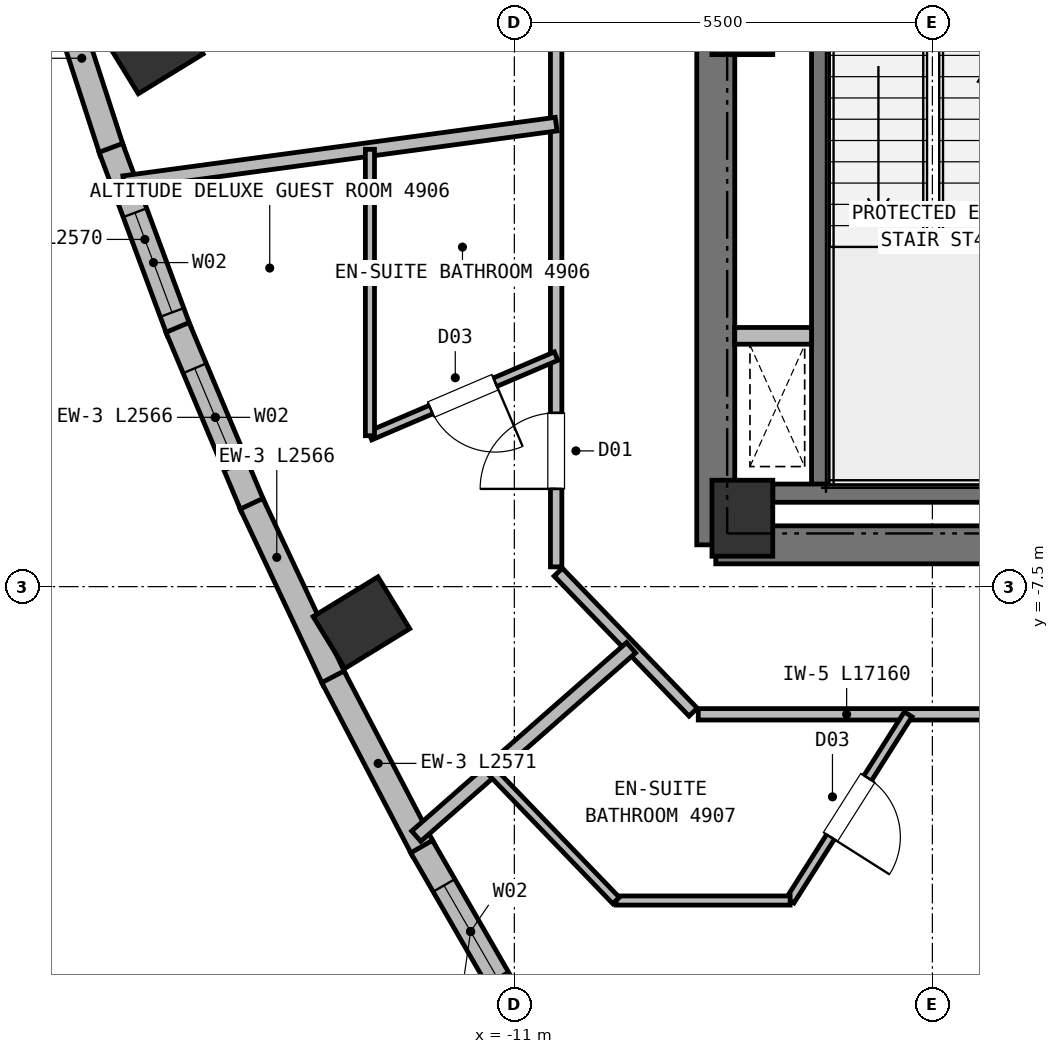
"""IFC4 building model, lengths in metres.
Left out: names, types, materials, properties, quantities, classifications, styles, units other than length and angle.
Written with IfcOpenShell. Run it as: python <this file> out.ifc"""

import sys

from ifc_helpers import new_model, si_unit, direction, frame, frame_2d, origin, origin_2d, place, context, subcontext, project, spatial, rectangle, extrude, element, fill, save


model = new_model("IFC4")
c1 = context("Model", 3, precision=1e-05, world=origin(), true_north=direction((0.0, 1.0)))
c2 = subcontext(c1, "Body", "Model", "MODEL_VIEW")
j1 = project(units=[si_unit("LENGTHUNIT", "METRE"), si_unit("PLANEANGLEUNIT", "RADIAN")], contexts=[c1])
p1 = place(None, origin())
s1 = spatial("IfcSite", under=j1, at=p1, CompositionType="ELEMENT")
p2 = place(p1, origin())
s2 = spatial("IfcBuilding", under=s1, at=p2, CompositionType="ELEMENT")
p3 = place(p2, frame((0.0, 0.0, 186.55)))
s3 = spatial("IfcBuildingStorey", under=s2, at=p3, CompositionType="ELEMENT", Elevation=186.55)
for number, where, z_axis, x_axis in (
    (1, (-8.0, -6.6, 0.0), (0.0, 0.0, 1.0), (1.0, 0.0, 0.0)),
    (2, (-8.0, 0.0, 0.0), (0.0, 0.0, 1.0), (1.0, 0.0, 0.0)),
):
    element("IfcColumn", number, at=place(p3, frame(where, z_axis=z_axis, x_axis=x_axis)), inside=s3, PredefinedType="COLUMN", context=c2, shape_type="SweptSolid", body=[
        extrude(rectangle(XDim=0.8, YDim=1.0, at=origin_2d()), origin(), (0.0, 0.0, 1.0), 3.8),
    ])
p4 = place(p3, frame((-8.35, -6.95, 0.0), z_axis=(0.0, 0.0, 1.0), x_axis=(1.0, 0.0, 0.0)))
e3 = element("IfcWall", 3, at=p4, inside=s3, PredefinedType="SHEAR", context=c2, shape_type="SweptSolid", body=[
    extrude(rectangle(XDim=3.95, YDim=0.5, at=frame_2d((1.975, 0.0))), origin(), (0.0, 0.0, 1.0), 3.55),
])
p5 = place(p3, frame((-8.35, -6.95, 0.0), z_axis=(0.0, 0.0, 1.0), x_axis=(0.0, 1.0, 0.0)))
e4 = element("IfcWall", 4, at=p5, inside=s3, PredefinedType="SHEAR", context=c2, shape_type="SweptSolid", body=[
    extrude(rectangle(XDim=8.1, YDim=0.5, at=frame_2d((4.05, 0.0))), origin(), (0.0, 0.0, 1.0), 3.55),
])
for number, where, z_axis, x_axis in (
    (5, (-15.73, -0.412, 0.0), (0.0, 0.0, 1.0), (-0.522, 0.853, 0.0)),
    (6, (-13.012, -7.974, 0.0), (0.0, 0.0, 1.0), (-0.522, 0.853, 0.0)),
):
    element("IfcColumn", number, at=place(p3, frame(where, z_axis=z_axis, x_axis=x_axis)), inside=s3, PredefinedType="COLUMN", context=c2, shape_type="SweptSolid", body=[
        extrude(rectangle(XDim=0.8, YDim=1.0, at=origin_2d()), origin(), (0.0, 0.0, 1.0), 3.8),
    ])
p6 = place(p3, frame((-16.293, -1.774, 0.0), z_axis=(0.0, 0.0, 1.0), x_axis=(-0.309148141518, 0.951013894008, 0.0)))
e7 = element("IfcWall", 7, at=p6, inside=s3, PredefinedType="SOLIDWALL", context=c2, shape_type="SweptSolid", body=[
    extrude(rectangle(XDim=2.579, YDim=0.33, at=frame_2d((1.29, 0.0))), origin(), (0.0, 0.0, 1.0), 3.55),
])
p7 = place(p3, frame((-15.413, -4.136, 0.0), z_axis=(0.0, 0.0, 1.0), x_axis=(-0.348582368666, 0.937278150954, 0.0)))
e8 = element("IfcWall", 8, at=p7, inside=s3, PredefinedType="SOLIDWALL", context=c2, shape_type="SweptSolid", body=[
    extrude(rectangle(XDim=2.57, YDim=0.33, at=frame_2d((1.285, 0.0))), origin(), (0.0, 0.0, 1.0), 3.55),
])
p8 = place(p7, frame((0.26, 0.0, 0.72)))
e9 = element("IfcOpeningElement", 9, at=p8, cuts=e8, PredefinedType="OPENING", context=c2, shape_type="SweptSolid", body=[
    extrude(rectangle(XDim=1.4, YDim=1.84, at=frame_2d((0.7, 0.92))), frame((0.0, 0.175, 0.0), z_axis=(0.0, -1.0, 0.0), x_axis=(1.0, 0.0, 0.0)), (0.0, 0.0, 1.0), 0.35),
])
p9 = place(p3, frame((-14.437, -6.455, 0.0), z_axis=(0.0, 0.0, 1.0), x_axis=(-0.387525243304, 0.921859092162, 0.0)))
e10 = element("IfcWall", 10, at=p9, inside=s3, PredefinedType="SOLIDWALL", context=c2, shape_type="SweptSolid", body=[
    extrude(rectangle(XDim=2.566, YDim=0.33, at=frame_2d((1.283, 0.0))), origin(), (0.0, 0.0, 1.0), 3.55),
])
p10 = place(p9, frame((0.583, 0.0, 0.72)))
e11 = element("IfcOpeningElement", 11, at=p10, cuts=e10, PredefinedType="OPENING", context=c2, shape_type="SweptSolid", body=[
    extrude(rectangle(XDim=1.4, YDim=1.84, at=frame_2d((0.7, 0.92))), frame((0.0, 0.175, 0.0), z_axis=(0.0, -1.0, 0.0), x_axis=(1.0, 0.0, 0.0)), (0.0, 0.0, 1.0), 0.35),
])
p11 = place(p3, frame((-13.365, -8.731, 0.0), z_axis=(0.0, 0.0, 1.0), x_axis=(-0.425774125911, 0.90482948322, 0.0)))
e12 = element("IfcWall", 12, at=p11, inside=s3, PredefinedType="SOLIDWALL", context=c2, shape_type="SweptSolid", body=[
    extrude(rectangle(XDim=2.566, YDim=0.33, at=frame_2d((1.283, 0.0))), origin(), (0.0, 0.0, 1.0), 3.55),
])
p12 = place(p3, frame((-12.196, -10.965, 0.0), z_axis=(0.0, 0.0, 1.0), x_axis=(-0.463361004434, 0.886169611062, 0.0)))
e13 = element("IfcWall", 13, at=p12, inside=s3, PredefinedType="SOLIDWALL", context=c2, shape_type="SweptSolid", body=[
    extrude(rectangle(XDim=2.571, YDim=0.33, at=frame_2d((1.285, 0.0))), origin(), (0.0, 0.0, 1.0), 3.55),
])
p13 = place(p3, frame((-10.931, -13.155, 0.0), z_axis=(0.0, 0.0, 1.0), x_axis=(-0.499875407217, 0.866097325513, 0.0)))
e14 = element("IfcWall", 14, at=p13, inside=s3, PredefinedType="SOLIDWALL", context=c2, shape_type="SweptSolid", body=[
    extrude(rectangle(XDim=2.579, YDim=0.33, at=frame_2d((1.29, 0.0))), origin(), (0.0, 0.0, 1.0), 3.55),
])
p14 = place(p13, frame((0.59, 0.0, 0.72)))
e15 = element("IfcOpeningElement", 15, at=p14, cuts=e14, PredefinedType="OPENING", context=c2, shape_type="SweptSolid", body=[
    extrude(rectangle(XDim=1.4, YDim=1.84, at=frame_2d((0.7, 0.92))), frame((0.0, 0.175, 0.0), z_axis=(0.0, -1.0, 0.0), x_axis=(1.0, 0.0, 0.0)), (0.0, 0.0, 1.0), 0.35),
])
p15 = place(p3, frame((-6.97, -6.16, 0.0), z_axis=(0.0, 0.0, 1.0), x_axis=(0.0, 1.0, 0.0)))
e16 = element("IfcWall", 16, at=p15, inside=s3, PredefinedType="SHEAR", context=c2, shape_type="SweptSolid", body=[
    extrude(rectangle(XDim=7.22, YDim=0.24, at=frame_2d((3.61, 0.0))), origin(), (0.0, 0.0, 1.0), 3.55),
])
p16 = place(p3, frame((-7.6, -6.27, 0.0), z_axis=(0.0, 0.0, 1.0), x_axis=(1.0, 0.0, 0.0)))
e17 = element("IfcWall", 17, at=p16, inside=s3, PredefinedType="SHEAR", context=c2, shape_type="SweptSolid", body=[
    extrude(rectangle(XDim=3.59, YDim=0.24, at=frame_2d((1.795, 0.0))), origin(), (0.0, 0.0, 1.0), 3.55),
])
p17 = place(p3, frame((-8.1, -4.2, 0.0), z_axis=(0.0, 0.0, 1.0), x_axis=(1.0, 0.0, 0.0)))
e18 = element("IfcWall", 18, at=p17, inside=s3, PredefinedType="PARTITIONING", context=c2, shape_type="SweptSolid", body=[
    extrude(rectangle(XDim=1.01, YDim=0.22, at=frame_2d((0.505, 0.0))), origin(), (0.0, 0.0, 1.0), 3.55),
])
p18 = place(p3, frame((8.58, -9.18, 0.0), z_axis=(0.0, 0.0, 1.0), x_axis=(-1.0, 0.0, 0.0)))
e19 = element("IfcWall", 19, at=p18, inside=s3, PredefinedType="PARTITIONING", context=c2, shape_type="SweptSolid", body=[
    extrude(rectangle(XDim=17.16, YDim=0.15, at=frame_2d((8.58, 0.0))), origin(), (0.0, 0.0, 1.0), 3.23),
])
p19 = place(p18, frame((2.444, 0.0, 0.0)))
e20 = element("IfcOpeningElement", 20, at=p19, cuts=e19, PredefinedType="OPENING", context=c2, shape_type="SweptSolid", body=[
    extrude(rectangle(XDim=0.95, YDim=2.1, at=frame_2d((0.475, 1.05))), frame((0.0, 0.085, 0.0), z_axis=(0.0, -1.0, 0.0), x_axis=(1.0, 0.0, 0.0)), (0.0, 0.0, 1.0), 0.17),
])
p20 = place(p18, frame((4.798, 0.0, 0.0)))
e21 = element("IfcOpeningElement", 21, at=p20, cuts=e19, PredefinedType="OPENING", context=c2, shape_type="SweptSolid", body=[
    extrude(rectangle(XDim=1.0, YDim=2.15, at=frame_2d((0.5, 1.075))), frame((0.0, 0.085, 0.0), z_axis=(0.0, -1.0, 0.0), x_axis=(1.0, 0.0, 0.0)), (0.0, 0.0, 1.0), 0.17),
])
p21 = place(p18, frame((12.096, 0.0, 0.0)))
e22 = element("IfcOpeningElement", 22, at=p21, cuts=e19, PredefinedType="OPENING", context=c2, shape_type="SweptSolid", body=[
    extrude(rectangle(XDim=1.06, YDim=2.15, at=frame_2d((0.53, 1.075))), frame((0.0, 0.085, 0.0), z_axis=(0.0, -1.0, 0.0), x_axis=(1.0, 0.0, 0.0)), (0.0, 0.0, 1.0), 0.17),
])
p22 = place(p18, frame((8.137, 0.0, 0.0)))
e23 = element("IfcOpeningElement", 23, at=p22, cuts=e19, PredefinedType="OPENING", context=c2, shape_type="SweptSolid", body=[
    extrude(rectangle(XDim=1.0, YDim=2.15, at=frame_2d((0.5, 1.075))), frame((0.0, 0.085, 0.0), z_axis=(0.0, -1.0, 0.0), x_axis=(1.0, 0.0, 0.0)), (0.0, 0.0, 1.0), 0.17),
])
p23 = place(p3, frame((-10.45, -7.24, 0.0), z_axis=(0.0, 0.0, 1.0), x_axis=(0.0, 1.0, 0.0)))
e24 = element("IfcWall", 24, at=p23, inside=s3, PredefinedType="PARTITIONING", context=c2, shape_type="SweptSolid", body=[
    extrude(rectangle(XDim=14.48, YDim=0.15, at=frame_2d((7.24, 0.0))), origin(), (0.0, 0.0, 1.0), 3.23),
])
p24 = place(p23, frame((1.026, 0.0, 0.0)))
e25 = element("IfcOpeningElement", 25, at=p24, cuts=e24, PredefinedType="OPENING", context=c2, shape_type="SweptSolid", body=[
    extrude(rectangle(XDim=1.0, YDim=2.15, at=frame_2d((0.5, 1.075))), frame((0.0, 0.085, 0.0), z_axis=(0.0, -1.0, 0.0), x_axis=(1.0, 0.0, 0.0)), (0.0, 0.0, 1.0), 0.17),
])
p25 = place(p23, frame((7.126, 0.0, 0.0)))
e26 = element("IfcOpeningElement", 26, at=p25, cuts=e24, PredefinedType="OPENING", context=c2, shape_type="SweptSolid", body=[
    extrude(rectangle(XDim=1.06, YDim=2.15, at=frame_2d((0.53, 1.075))), frame((0.0, 0.085, 0.0), z_axis=(0.0, -1.0, 0.0), x_axis=(1.0, 0.0, 0.0)), (0.0, 0.0, 1.0), 0.17),
])
p26 = place(p3, frame((-8.648, -9.151, 0.0), z_axis=(0.0, 0.0, 1.0), x_axis=(-0.693764562202, 0.720201869085, 0.0)))
e27 = element("IfcWall", 27, at=p26, inside=s3, PredefinedType="PARTITIONING", context=c2, shape_type="SweptSolid", body=[
    extrude(rectangle(XDim=2.558, YDim=0.15, at=frame_2d((1.279, 0.0))), origin(), (0.0, 0.0, 1.0), 3.23),
])
p27 = place(p3, frame((-10.45, -1.415, 0.0), z_axis=(0.0, 0.0, 1.0), x_axis=(-0.990963730959, -0.13413010074, 0.0)))
e28 = element("IfcWall", 28, at=p27, inside=s3, PredefinedType="PARTITIONING", context=c2, shape_type="SweptSolid", body=[
    extrude(rectangle(XDim=5.741, YDim=0.18, at=frame_2d((2.87, 0.0))), origin(), (0.0, 0.0, 1.0), 3.55),
])
p28 = place(p3, frame((-10.45, -4.467, 0.0), z_axis=(0.0, 0.0, 1.0), x_axis=(-0.919533231313, -0.39301226, 0.0)))
e29 = element("IfcWall", 29, at=p28, inside=s3, PredefinedType="PARTITIONING", context=c2, shape_type="SweptSolid", body=[
    extrude(rectangle(XDim=2.664, YDim=0.12, at=frame_2d((1.332, 0.0))), origin(), (0.0, 0.0, 1.0), 3.55),
])
p29 = place(p28, frame((0.872, 0.0, 0.0)))
e30 = element("IfcOpeningElement", 30, at=p29, cuts=e29, PredefinedType="OPENING", context=c2, shape_type="SweptSolid", body=[
    extrude(rectangle(XDim=0.92, YDim=2.1, at=frame_2d((0.46, 1.05))), frame((0.0, 0.07, 0.0), z_axis=(0.0, -1.0, 0.0), x_axis=(1.0, 0.0, 0.0)), (0.0, 0.0, 1.0), 0.14),
])
p30 = place(p3, frame((-12.9, -1.746, 0.0), z_axis=(0.0, 0.0, 1.0), x_axis=(0.0, -1.0, 0.0)))
e31 = element("IfcWall", 31, at=p30, inside=s3, PredefinedType="PARTITIONING", context=c2, shape_type="SweptSolid", body=[
    extrude(rectangle(XDim=3.768, YDim=0.12, at=frame_2d((1.884, 0.0))), origin(), (0.0, 0.0, 1.0), 3.23),
])
p31 = place(p3, frame((-9.464, -8.304, 0.0), z_axis=(0.0, 0.0, 1.0), x_axis=(-0.751699255643, -0.659506049302, 0.0)))
e32 = element("IfcWall", 32, at=p31, inside=s3, PredefinedType="PARTITIONING", context=c2, shape_type="SweptSolid", body=[
    extrude(rectangle(XDim=3.76, YDim=0.18, at=frame_2d((1.88, 0.0))), origin(), (0.0, 0.0, 1.0), 3.55),
])
p32 = place(p3, frame((-5.819, -9.18, 0.0), z_axis=(0.0, 0.0, 1.0), x_axis=(-0.535382431743, -0.844609763015, 0.0)))
e33 = element("IfcWall", 33, at=p32, inside=s3, PredefinedType="PARTITIONING", context=c2, shape_type="SweptSolid", body=[
    extrude(rectangle(XDim=2.901, YDim=0.12, at=frame_2d((1.45, 0.0))), origin(), (0.0, 0.0, 1.0), 3.55),
])
p33 = place(p32, frame((0.99, 0.0, 0.0)))
e34 = element("IfcOpeningElement", 34, at=p33, cuts=e33, PredefinedType="OPENING", context=c2, shape_type="SweptSolid", body=[
    extrude(rectangle(XDim=0.92, YDim=2.1, at=frame_2d((0.46, 1.05))), frame((0.0, 0.07, 0.0), z_axis=(0.0, -1.0, 0.0), x_axis=(1.0, 0.0, 0.0)), (0.0, 0.0, 1.0), 0.14),
])
p34 = place(p3, frame((-7.372, -11.63, 0.0), z_axis=(0.0, 0.0, 1.0), x_axis=(-1.0, 0.0, 0.0)))
e35 = element("IfcWall", 35, at=p34, inside=s3, PredefinedType="PARTITIONING", context=c2, shape_type="SweptSolid", body=[
    extrude(rectangle(XDim=2.29, YDim=0.12, at=frame_2d((1.145, 0.0))), origin(), (0.0, 0.0, 1.0), 3.55),
])
p35 = place(p3, frame((-11.308, -9.921, 0.0), z_axis=(0.0, 0.0, 1.0), x_axis=(0.693706945125, -0.7202573667, 0.0)))
e36 = element("IfcWall", 36, at=p35, inside=s3, PredefinedType="PARTITIONING", context=c2, shape_type="SweptSolid", body=[
    extrude(rectangle(XDim=2.372, YDim=0.12, at=frame_2d((1.186, 0.0))), origin(), (0.0, 0.0, 1.0), 2.98),
])
p36 = place(p3, frame((-2.145, -9.18, 0.0), z_axis=(0.0, 0.0, 1.0), x_axis=(-0.22755258656, -0.973765793376, 0.0)))
e37 = element("IfcWall", 37, at=p36, inside=s3, PredefinedType="PARTITIONING", context=c2, shape_type="SweptSolid", body=[
    extrude(rectangle(XDim=12.569, YDim=0.18, at=frame_2d((6.285, 0.0))), origin(), (0.0, 0.0, 1.0), 3.55),
])
p37 = place(p8, origin())
e38 = element("IfcWindow", 38, at=p37, inside=s3, PartitioningType="SINGLE_PANEL", PredefinedType="WINDOW", context=c2, shape_type="SweptSolid", body=[
    extrude(rectangle(XDim=1.4, YDim=1.84, at=frame_2d((0.7, 0.92))), frame((0.0, 0.03, 0.0), z_axis=(0.0, -1.0, 0.0), x_axis=(1.0, 0.0, 0.0)), (0.0, 0.0, 1.0), 0.06),
])
fill(e9, e38)
p38 = place(p10, origin())
e39 = element("IfcWindow", 39, at=p38, inside=s3, PartitioningType="SINGLE_PANEL", PredefinedType="WINDOW", context=c2, shape_type="SweptSolid", body=[
    extrude(rectangle(XDim=1.4, YDim=1.84, at=frame_2d((0.7, 0.92))), frame((0.0, 0.03, 0.0), z_axis=(0.0, -1.0, 0.0), x_axis=(1.0, 0.0, 0.0)), (0.0, 0.0, 1.0), 0.06),
])
fill(e11, e39)
p39 = place(p14, origin())
e40 = element("IfcWindow", 40, at=p39, inside=s3, PartitioningType="SINGLE_PANEL", PredefinedType="WINDOW", context=c2, shape_type="SweptSolid", body=[
    extrude(rectangle(XDim=1.4, YDim=1.84, at=frame_2d((0.7, 0.92))), frame((0.0, 0.03, 0.0), z_axis=(0.0, -1.0, 0.0), x_axis=(1.0, 0.0, 0.0)), (0.0, 0.0, 1.0), 0.06),
])
fill(e15, e40)
p40 = place(p29, origin())
e41 = element("IfcDoor", 41, at=p40, inside=s3, OperationType="SINGLE_SWING_LEFT", PredefinedType="DOOR", context=c2, shape_type="SweptSolid", body=[
    extrude(rectangle(XDim=0.92, YDim=2.1, at=frame_2d((0.46, 1.05))), frame((0.0, 0.025, 0.0), z_axis=(0.0, -1.0, 0.0), x_axis=(1.0, 0.0, 0.0)), (0.0, 0.0, 1.0), 0.05),
])
fill(e30, e41)
p41 = place(p33, origin())
e42 = element("IfcDoor", 42, at=p41, inside=s3, OperationType="SINGLE_SWING_RIGHT", PredefinedType="DOOR", context=c2, shape_type="SweptSolid", body=[
    extrude(rectangle(XDim=0.92, YDim=2.1, at=frame_2d((0.46, 1.05))), frame((0.0, 0.025, 0.0), z_axis=(0.0, -1.0, 0.0), x_axis=(1.0, 0.0, 0.0)), (0.0, 0.0, 1.0), 0.05),
])
fill(e34, e42)
p42 = place(p24, origin())
e43 = element("IfcDoor", 43, at=p42, inside=s3, OperationType="SINGLE_SWING_LEFT", PredefinedType="DOOR", context=c2, shape_type="SweptSolid", body=[
    extrude(rectangle(XDim=1.0, YDim=2.15, at=frame_2d((0.5, 1.075))), frame((0.0, 0.025, 0.0), z_axis=(0.0, -1.0, 0.0), x_axis=(1.0, 0.0, 0.0)), (0.0, 0.0, 1.0), 0.05),
])
fill(e25, e43)
save(model, sys.argv[1])
